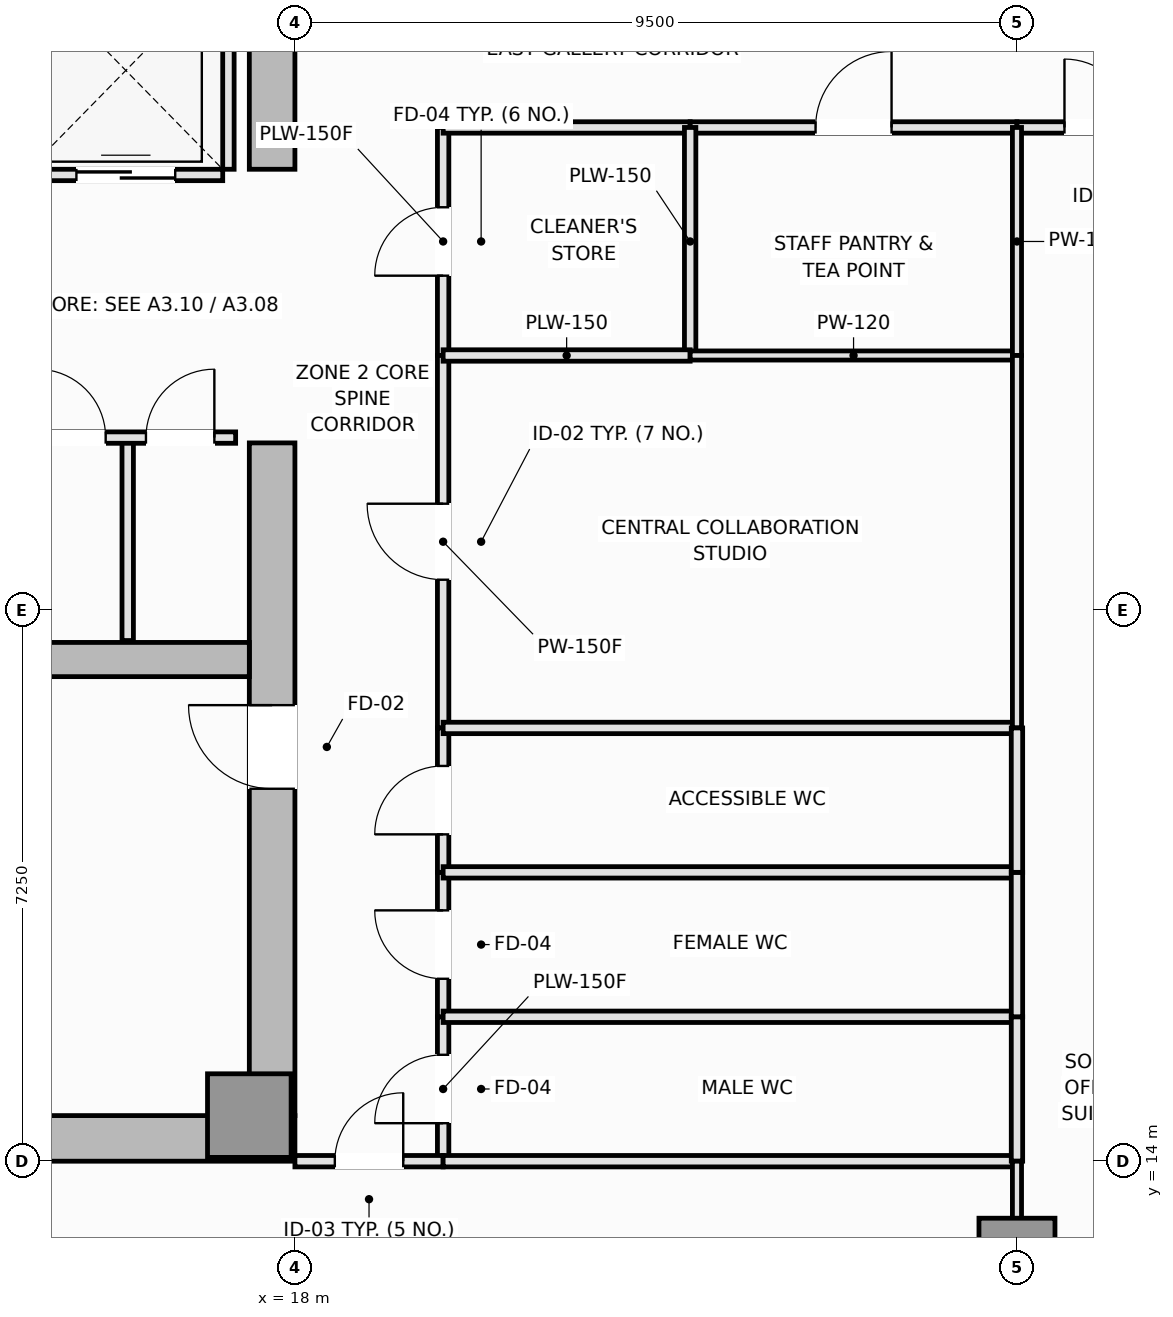
"""IFC4 building model, lengths in metres.
Left out: names, types, materials, properties, quantities, classifications, styles, units other than length and angle.
Written with IfcOpenShell. Run it as: python <this file> out.ifc"""

import sys

from ifc_helpers import new_model, si_unit, direction, frame, frame_2d, origin, origin_2d, place, context, subcontext, project, spatial, rectangle, extrude, element, fill, save


model = new_model("IFC4")
c1 = context("Model", 3, precision=1e-05, world=origin(), true_north=direction((0.0, 1.0)))
c2 = subcontext(c1, "Body", "Model", "MODEL_VIEW")
j1 = project(units=[si_unit("LENGTHUNIT", "METRE"), si_unit("PLANEANGLEUNIT", "RADIAN")], contexts=[c1])
p1 = place(None, origin())
s1 = spatial("IfcSite", under=j1, at=p1, CompositionType="ELEMENT")
p2 = place(p1, origin())
s2 = spatial("IfcBuilding", under=s1, at=p2, CompositionType="ELEMENT")
p3 = place(p2, frame((0.0, 0.0, 159.05)))
s3 = spatial("IfcBuildingStorey", under=s2, at=p3, CompositionType="ELEMENT", Elevation=159.05)
p4 = place(p3, frame((4.5, 14.3, 0.0), z_axis=(0.0, 0.0, 1.0), x_axis=(1.0, 0.0, 0.0)))
e1 = element("IfcWall", 1, at=p4, inside=s3, PredefinedType="SHEAR", context=c2, shape_type="SweptSolid", body=[
    extrude(rectangle(XDim=13.5, YDim=0.6, at=frame_2d((6.75, 0.0))), origin(), (0.0, 0.0, 1.0), 3.55),
])
p5 = place(p3, frame((17.7, 14.6, 0.0), z_axis=(0.0, 0.0, 1.0), x_axis=(0.0, 1.0, 0.0)))
e2 = element("IfcWall", 2, at=p5, inside=s3, PredefinedType="SHEAR", context=c2, shape_type="SweptSolid", body=[
    extrude(rectangle(XDim=8.85, YDim=0.6, at=frame_2d((4.425, 0.0))), origin(), (0.0, 0.0, 1.0), 3.55),
])
p6 = place(p5, frame((4.3, 0.0, 0.0)))
e3 = element("IfcOpeningElement", 3, at=p6, cuts=e2, PredefinedType="OPENING", context=c2, shape_type="SweptSolid", body=[
    extrude(rectangle(XDim=1.1, YDim=2.15, at=frame_2d((0.55, 1.075))), frame((0.0, 0.31, 0.0), z_axis=(0.0, -1.0, 0.0), x_axis=(1.0, 0.0, 0.0)), (0.0, 0.0, 1.0), 0.62),
])
p7 = place(p3, frame((17.7, 27.05, 0.0), z_axis=(0.0, 0.0, 1.0), x_axis=(0.0, 1.0, 0.0)))
e4 = element("IfcWall", 4, at=p7, inside=s3, PredefinedType="SHEAR", context=c2, shape_type="SweptSolid", body=[
    extrude(rectangle(XDim=8.85, YDim=0.6, at=frame_2d((4.425, 0.0))), origin(), (0.0, 0.0, 1.0), 3.55),
])
p8 = place(p7, frame((3.45, 0.0, 0.0)))
e5 = element("IfcOpeningElement", 5, at=p8, cuts=e4, PredefinedType="OPENING", context=c2, shape_type="SweptSolid", body=[
    extrude(rectangle(XDim=1.1, YDim=2.15, at=frame_2d((0.55, 1.075))), frame((0.0, 0.31, 0.0), z_axis=(0.0, -1.0, 0.0), x_axis=(1.0, 0.0, 0.0)), (0.0, 0.0, 1.0), 0.62),
])
p9 = place(p3, frame((5.1, 20.6, 0.0), z_axis=(0.0, 0.0, 1.0), x_axis=(1.0, 0.0, 0.0)))
e6 = element("IfcWall", 6, at=p9, inside=s3, PredefinedType="SHEAR", context=c2, shape_type="SweptSolid", body=[
    extrude(rectangle(XDim=12.3, YDim=0.45, at=frame_2d((6.15, 0.0))), origin(), (0.0, 0.0, 1.0), 3.55),
])
p10 = place(p3, frame((17.4, 14.6, 0.0), z_axis=(0.0, 0.0, 1.0), x_axis=(1.0, 0.0, 0.0)))
e7 = element("IfcColumn", 7, at=p10, inside=s3, PredefinedType="PILASTER", context=c2, shape_type="SweptSolid", body=[
    extrude(rectangle(XDim=1.1, YDim=1.1, at=origin_2d()), origin(), (0.0, 0.0, 1.0), 3.55),
])
p11 = place(p3, frame((27.5, 12.75, 0.0), z_axis=(0.0, 0.0, 1.0), x_axis=(1.0, 0.0, 0.0)))
e8 = element("IfcColumn", 8, at=p11, inside=s3, PredefinedType="COLUMN", context=c2, shape_type="SweptSolid", body=[
    extrude(rectangle(XDim=1.0, YDim=1.0, at=origin_2d()), origin(), (0.0, 0.0, 1.0), 3.55),
])
p12 = place(p3, frame((14.5, 26.975, 0.0), z_axis=(0.0, 0.0, 1.0), x_axis=(1.0, 0.0, 0.0)))
e9 = element("IfcWall", 9, at=p12, inside=s3, PredefinedType="PARTITIONING", context=c2, shape_type="SweptSolid", body=[
    extrude(rectangle(XDim=2.55, YDim=0.15, at=frame_2d((1.275, 0.0))), origin(), (0.0, 0.0, 1.0), 3.37),
])
p13 = place(p12, frame((0.625, 0.0, 0.0)))
e10 = element("IfcOpeningElement", 10, at=p13, cuts=e9, PredefinedType="OPENING", context=c2, shape_type="SweptSolid", body=[
    extrude(rectangle(XDim=1.3, YDim=2.2, at=frame_2d((0.65, 1.1))), frame((0.0, 0.085, 0.0), z_axis=(0.0, -1.0, 0.0), x_axis=(1.0, 0.0, 0.0)), (0.0, 0.0, 1.0), 0.17),
])
p14 = place(p3, frame((17.125, 27.05, 0.0), z_axis=(0.0, 0.0, 1.0), x_axis=(0.0, 1.0, 0.0)))
e11 = element("IfcWall", 11, at=p14, inside=s3, PredefinedType="PARTITIONING", context=c2, shape_type="SweptSolid", body=[
    extrude(rectangle(XDim=2.6, YDim=0.15, at=frame_2d((1.3, 0.0))), origin(), (0.0, 0.0, 1.0), 3.37),
])
p15 = place(p3, frame((15.8, 20.85, 0.0), z_axis=(0.0, 0.0, 1.0), x_axis=(0.0, 1.0, 0.0)))
e12 = element("IfcWall", 12, at=p15, inside=s3, PredefinedType="PARTITIONING", context=c2, shape_type="SweptSolid", body=[
    extrude(rectangle(XDim=2.67, YDim=0.15, at=frame_2d((1.335, 0.0))), origin(), (0.0, 0.0, 1.0), 3.37),
])
p16 = place(p3, frame((14.33, 23.52, 0.0), z_axis=(0.0, 0.0, 1.0), x_axis=(1.0, 0.0, 0.0)))
e13 = element("IfcWall", 13, at=p16, inside=s3, PredefinedType="PARTITIONING", context=c2, shape_type="SweptSolid", body=[
    extrude(rectangle(XDim=2.89, YDim=0.15, at=frame_2d((1.445, 0.0))), origin(), (0.0, 0.0, 1.0), 3.37),
])
p17 = place(p16, frame((0.28, 0.0, 0.0)))
e14 = element("IfcOpeningElement", 14, at=p17, cuts=e13, PredefinedType="OPENING", context=c2, shape_type="SweptSolid", body=[
    extrude(rectangle(XDim=0.9, YDim=2.1, at=frame_2d((0.45, 1.05))), frame((0.0, 0.085, 0.0), z_axis=(0.0, -1.0, 0.0), x_axis=(1.0, 0.0, 0.0)), (0.0, 0.0, 1.0), 0.17),
])
p18 = place(p16, frame((1.71, 0.0, 0.0)))
e15 = element("IfcOpeningElement", 15, at=p18, cuts=e13, PredefinedType="OPENING", context=c2, shape_type="SweptSolid", body=[
    extrude(rectangle(XDim=0.9, YDim=2.1, at=frame_2d((0.45, 1.05))), frame((0.0, 0.085, 0.0), z_axis=(0.0, -1.0, 0.0), x_axis=(1.0, 0.0, 0.0)), (0.0, 0.0, 1.0), 0.17),
])
p19 = place(p3, frame((19.95, 24.6, 0.0), z_axis=(0.0, 0.0, 1.0), x_axis=(0.0, 1.0, 0.0)))
e16 = element("IfcWall", 16, at=p19, inside=s3, PredefinedType="PLUMBINGWALL", context=c2, shape_type="SweptSolid", body=[
    extrude(rectangle(XDim=3.0, YDim=0.15, at=frame_2d((1.5, 0.0))), origin(), (0.0, 0.0, 1.0), 3.37),
])
p20 = place(p19, frame((1.05, 0.0, 0.0)))
e17 = element("IfcOpeningElement", 17, at=p20, cuts=e16, PredefinedType="OPENING", context=c2, shape_type="SweptSolid", body=[
    extrude(rectangle(XDim=0.9, YDim=2.1, at=frame_2d((0.45, 1.05))), frame((0.0, 0.085, 0.0), z_axis=(0.0, -1.0, 0.0), x_axis=(1.0, 0.0, 0.0)), (0.0, 0.0, 1.0), 0.17),
])
p21 = place(p3, frame((19.95, 19.7, 0.0), z_axis=(0.0, 0.0, 1.0), x_axis=(0.0, 1.0, 0.0)))
e18 = element("IfcWall", 18, at=p21, inside=s3, PredefinedType="PARTITIONING", context=c2, shape_type="SweptSolid", body=[
    extrude(rectangle(XDim=4.9, YDim=0.15, at=frame_2d((2.45, 0.0))), origin(), (0.0, 0.0, 1.0), 3.37),
])
p22 = place(p21, frame((1.95, 0.0, 0.0)))
e19 = element("IfcOpeningElement", 19, at=p22, cuts=e18, PredefinedType="OPENING", context=c2, shape_type="SweptSolid", body=[
    extrude(rectangle(XDim=1.0, YDim=2.15, at=frame_2d((0.5, 1.075))), frame((0.0, 0.085, 0.0), z_axis=(0.0, -1.0, 0.0), x_axis=(1.0, 0.0, 0.0)), (0.0, 0.0, 1.0), 0.17),
])
p23 = place(p3, frame((19.95, 14.0, 0.0), z_axis=(0.0, 0.0, 1.0), x_axis=(0.0, 1.0, 0.0)))
e20 = element("IfcWall", 20, at=p23, inside=s3, PredefinedType="PLUMBINGWALL", context=c2, shape_type="SweptSolid", body=[
    extrude(rectangle(XDim=1.9, YDim=0.15, at=frame_2d((0.95, 0.0))), origin(), (0.0, 0.0, 1.0), 3.37),
])
p24 = place(p23, frame((0.5, 0.0, 0.0)))
e21 = element("IfcOpeningElement", 21, at=p24, cuts=e20, PredefinedType="OPENING", context=c2, shape_type="SweptSolid", body=[
    extrude(rectangle(XDim=0.9, YDim=2.1, at=frame_2d((0.45, 1.05))), frame((0.0, 0.085, 0.0), z_axis=(0.0, -1.0, 0.0), x_axis=(1.0, 0.0, 0.0)), (0.0, 0.0, 1.0), 0.17),
])
p25 = place(p3, frame((19.95, 15.9, 0.0), z_axis=(0.0, 0.0, 1.0), x_axis=(0.0, 1.0, 0.0)))
e22 = element("IfcWall", 22, at=p25, inside=s3, PredefinedType="PLUMBINGWALL", context=c2, shape_type="SweptSolid", body=[
    extrude(rectangle(XDim=1.9, YDim=0.15, at=frame_2d((0.95, 0.0))), origin(), (0.0, 0.0, 1.0), 3.37),
])
p26 = place(p25, frame((0.5, 0.0, 0.0)))
e23 = element("IfcOpeningElement", 23, at=p26, cuts=e22, PredefinedType="OPENING", context=c2, shape_type="SweptSolid", body=[
    extrude(rectangle(XDim=0.9, YDim=2.1, at=frame_2d((0.45, 1.05))), frame((0.0, 0.085, 0.0), z_axis=(0.0, -1.0, 0.0), x_axis=(1.0, 0.0, 0.0)), (0.0, 0.0, 1.0), 0.17),
])
p27 = place(p3, frame((19.95, 17.8, 0.0), z_axis=(0.0, 0.0, 1.0), x_axis=(0.0, 1.0, 0.0)))
e24 = element("IfcWall", 24, at=p27, inside=s3, PredefinedType="PLUMBINGWALL", context=c2, shape_type="SweptSolid", body=[
    extrude(rectangle(XDim=1.9, YDim=0.15, at=frame_2d((0.95, 0.0))), origin(), (0.0, 0.0, 1.0), 3.37),
])
p28 = place(p27, frame((0.5, 0.0, 0.0)))
e25 = element("IfcOpeningElement", 25, at=p28, cuts=e24, PredefinedType="OPENING", context=c2, shape_type="SweptSolid", body=[
    extrude(rectangle(XDim=0.9, YDim=2.1, at=frame_2d((0.45, 1.05))), frame((0.0, 0.085, 0.0), z_axis=(0.0, -1.0, 0.0), x_axis=(1.0, 0.0, 0.0)), (0.0, 0.0, 1.0), 0.17),
])
p29 = place(p3, frame((18.0, 14.0, 0.0), z_axis=(0.0, 0.0, 1.0), x_axis=(1.0, 0.0, 0.0)))
e26 = element("IfcWall", 26, at=p29, inside=s3, PredefinedType="PARTITIONING", context=c2, shape_type="SweptSolid", body=[
    extrude(rectangle(XDim=1.95, YDim=0.15, at=frame_2d((0.975, 0.0))), origin(), (0.0, 0.0, 1.0), 3.37),
])
p30 = place(p29, frame((0.525, 0.0, 0.0)))
e27 = element("IfcOpeningElement", 27, at=p30, cuts=e26, PredefinedType="OPENING", context=c2, shape_type="SweptSolid", body=[
    extrude(rectangle(XDim=0.9, YDim=2.1, at=frame_2d((0.45, 1.05))), frame((0.0, 0.085, 0.0), z_axis=(0.0, -1.0, 0.0), x_axis=(1.0, 0.0, 0.0)), (0.0, 0.0, 1.0), 0.17),
])
p31 = place(p3, frame((19.95, 27.6, 0.0), z_axis=(0.0, 0.0, 1.0), x_axis=(1.0, 0.0, 0.0)))
e28 = element("IfcWall", 28, at=p31, inside=s3, PredefinedType="PLUMBINGWALL", context=c2, shape_type="SweptSolid", body=[
    extrude(rectangle(XDim=3.25, YDim=0.15, at=frame_2d((1.625, 0.0))), origin(), (0.0, 0.0, 1.0), 3.37),
])
p32 = place(p3, frame((23.2, 27.6, 0.0), z_axis=(0.0, 0.0, 1.0), x_axis=(1.0, 0.0, 0.0)))
e29 = element("IfcWall", 29, at=p32, inside=s3, PredefinedType="PARTITIONING", context=c2, shape_type="SweptSolid", body=[
    extrude(rectangle(XDim=4.3, YDim=0.15, at=frame_2d((2.15, 0.0))), origin(), (0.0, 0.0, 1.0), 3.37),
])
p33 = place(p32, frame((1.65, 0.0, 0.0)))
e30 = element("IfcOpeningElement", 30, at=p33, cuts=e29, PredefinedType="OPENING", context=c2, shape_type="SweptSolid", body=[
    extrude(rectangle(XDim=1.0, YDim=2.15, at=frame_2d((0.5, 1.075))), frame((0.0, 0.085, 0.0), z_axis=(0.0, -1.0, 0.0), x_axis=(1.0, 0.0, 0.0)), (0.0, 0.0, 1.0), 0.17),
])
p34 = place(p3, frame((27.5, 27.6, 0.0), z_axis=(0.0, 0.0, 1.0), x_axis=(1.0, 0.0, 0.0)))
e31 = element("IfcWall", 31, at=p34, inside=s3, PredefinedType="PARTITIONING", context=c2, shape_type="SweptSolid", body=[
    extrude(rectangle(XDim=2.15, YDim=0.15, at=frame_2d((1.075, 0.0))), origin(), (0.0, 0.0, 1.0), 3.37),
])
p35 = place(p34, frame((0.625, 0.0, 0.0)))
e32 = element("IfcOpeningElement", 32, at=p35, cuts=e31, PredefinedType="OPENING", context=c2, shape_type="SweptSolid", body=[
    extrude(rectangle(XDim=0.9, YDim=2.1, at=frame_2d((0.45, 1.05))), frame((0.0, 0.085, 0.0), z_axis=(0.0, -1.0, 0.0), x_axis=(1.0, 0.0, 0.0)), (0.0, 0.0, 1.0), 0.17),
])
p36 = place(p3, frame((23.2, 24.6, 0.0), z_axis=(0.0, 0.0, 1.0), x_axis=(0.0, 1.0, 0.0)))
e33 = element("IfcWall", 33, at=p36, inside=s3, PredefinedType="PLUMBINGWALL", context=c2, shape_type="SweptSolid", body=[
    extrude(rectangle(XDim=3.0, YDim=0.15, at=frame_2d((1.5, 0.0))), origin(), (0.0, 0.0, 1.0), 3.37),
])
p37 = place(p3, frame((19.95, 24.6, 0.0), z_axis=(0.0, 0.0, 1.0), x_axis=(1.0, 0.0, 0.0)))
e34 = element("IfcWall", 34, at=p37, inside=s3, PredefinedType="PLUMBINGWALL", context=c2, shape_type="SweptSolid", body=[
    extrude(rectangle(XDim=3.25, YDim=0.15, at=frame_2d((1.625, 0.0))), origin(), (0.0, 0.0, 1.0), 3.37),
])
p38 = place(p3, frame((23.2, 24.6, 0.0), z_axis=(0.0, 0.0, 1.0), x_axis=(1.0, 0.0, 0.0)))
e35 = element("IfcWall", 35, at=p38, inside=s3, PredefinedType="PARTITIONING", context=c2, shape_type="SweptSolid", body=[
    extrude(rectangle(XDim=4.3, YDim=0.12, at=frame_2d((2.15, 0.0))), origin(), (0.0, 0.0, 1.0), 3.37),
])
p39 = place(p3, frame((27.5, 24.6, 0.0), z_axis=(0.0, 0.0, 1.0), x_axis=(0.0, 1.0, 0.0)))
e36 = element("IfcWall", 36, at=p39, inside=s3, PredefinedType="PARTITIONING", context=c2, shape_type="SweptSolid", body=[
    extrude(rectangle(XDim=3.0, YDim=0.12, at=frame_2d((1.5, 0.0))), origin(), (0.0, 0.0, 1.0), 3.37),
])
p40 = place(p3, frame((19.95, 19.7, 0.0), z_axis=(0.0, 0.0, 1.0), x_axis=(1.0, 0.0, 0.0)))
e37 = element("IfcWall", 37, at=p40, inside=s3, PredefinedType="PLUMBINGWALL", context=c2, shape_type="SweptSolid", body=[
    extrude(rectangle(XDim=7.55, YDim=0.15, at=frame_2d((3.775, 0.0))), origin(), (0.0, 0.0, 1.0), 3.37),
])
p41 = place(p3, frame((27.5, 19.7, 0.0), z_axis=(0.0, 0.0, 1.0), x_axis=(0.0, 1.0, 0.0)))
e38 = element("IfcWall", 38, at=p41, inside=s3, PredefinedType="PARTITIONING", context=c2, shape_type="SweptSolid", body=[
    extrude(rectangle(XDim=4.9, YDim=0.12, at=frame_2d((2.45, 0.0))), origin(), (0.0, 0.0, 1.0), 3.37),
])
for number, where, z_axis, x_axis in (
    (39, (19.95, 15.9, 0.0), (0.0, 0.0, 1.0), (1.0, 0.0, 0.0)),
    (40, (19.95, 14.0, 0.0), (0.0, 0.0, 1.0), (1.0, 0.0, 0.0)),
):
    element("IfcWall", number, at=place(p3, frame(where, z_axis=z_axis, x_axis=x_axis)), inside=s3, PredefinedType="PLUMBINGWALL", context=c2, shape_type="SweptSolid", body=[
        extrude(rectangle(XDim=7.55, YDim=0.15, at=frame_2d((3.775, 0.0))), origin(), (0.0, 0.0, 1.0), 3.37),
    ])
p42 = place(p3, frame((27.5, 14.0, 0.0), z_axis=(0.0, 0.0, 1.0), x_axis=(0.0, 1.0, 0.0)))
e41 = element("IfcWall", 41, at=p42, inside=s3, PredefinedType="PLUMBINGWALL", context=c2, shape_type="SweptSolid", body=[
    extrude(rectangle(XDim=1.9, YDim=0.15, at=frame_2d((0.95, 0.0))), origin(), (0.0, 0.0, 1.0), 3.37),
])
p43 = place(p3, frame((19.95, 17.8, 0.0), z_axis=(0.0, 0.0, 1.0), x_axis=(1.0, 0.0, 0.0)))
e42 = element("IfcWall", 42, at=p43, inside=s3, PredefinedType="PLUMBINGWALL", context=c2, shape_type="SweptSolid", body=[
    extrude(rectangle(XDim=7.55, YDim=0.15, at=frame_2d((3.775, 0.0))), origin(), (0.0, 0.0, 1.0), 3.37),
])
p44 = place(p3, frame((27.5, 15.9, 0.0), z_axis=(0.0, 0.0, 1.0), x_axis=(0.0, 1.0, 0.0)))
e43 = element("IfcWall", 43, at=p44, inside=s3, PredefinedType="PLUMBINGWALL", context=c2, shape_type="SweptSolid", body=[
    extrude(rectangle(XDim=1.9, YDim=0.15, at=frame_2d((0.95, 0.0))), origin(), (0.0, 0.0, 1.0), 3.37),
])
p45 = place(p3, frame((27.5, 17.8, 0.0), z_axis=(0.0, 0.0, 1.0), x_axis=(0.0, 1.0, 0.0)))
e44 = element("IfcWall", 44, at=p45, inside=s3, PredefinedType="PLUMBINGWALL", context=c2, shape_type="SweptSolid", body=[
    extrude(rectangle(XDim=1.9, YDim=0.15, at=frame_2d((0.95, 0.0))), origin(), (0.0, 0.0, 1.0), 3.37),
])
p46 = place(p3, frame((27.5, 3.51, 0.0), z_axis=(0.0, 0.0, 1.0), x_axis=(0.0, 1.0, 0.0)))
e45 = element("IfcWall", 45, at=p46, inside=s3, PredefinedType="PARTITIONING", context=c2, shape_type="SweptSolid", body=[
    extrude(rectangle(XDim=10.49, YDim=0.12, at=frame_2d((5.245, 0.0))), origin(), (0.0, 0.0, 1.0), 2.87),
])
p47 = place(p13, origin())
e46 = element("IfcDoor", 46, at=p47, inside=s3, OperationType="DOUBLE_DOOR_SLIDING", PredefinedType="DOOR", context=c2, shape_type="SweptSolid", body=[
    extrude(rectangle(XDim=1.3, YDim=2.2, at=frame_2d((0.65, 1.1))), frame((0.0, 0.025, 0.0), z_axis=(0.0, -1.0, 0.0), x_axis=(1.0, 0.0, 0.0)), (0.0, 0.0, 1.0), 0.05),
])
fill(e10, e46)
p48 = place(p6, origin())
e47 = element("IfcDoor", 47, at=p48, inside=s3, OperationType="SINGLE_SWING_RIGHT", PredefinedType="DOOR", context=c2, shape_type="SweptSolid", body=[
    extrude(rectangle(XDim=1.1, YDim=2.15, at=frame_2d((0.55, 1.075))), frame((0.0, 0.025, 0.0), z_axis=(0.0, -1.0, 0.0), x_axis=(1.0, 0.0, 0.0)), (0.0, 0.0, 1.0), 0.05),
])
fill(e3, e47)
p49 = place(p17, origin())
e48 = element("IfcDoor", 48, at=p49, inside=s3, OperationType="SINGLE_SWING_LEFT", PredefinedType="DOOR", context=c2, shape_type="SweptSolid", body=[
    extrude(rectangle(XDim=0.9, YDim=2.1, at=frame_2d((0.45, 1.05))), frame((0.0, 0.025, 0.0), z_axis=(0.0, -1.0, 0.0), x_axis=(1.0, 0.0, 0.0)), (0.0, 0.0, 1.0), 0.05),
])
fill(e14, e48)
p50 = place(p18, origin())
e49 = element("IfcDoor", 49, at=p50, inside=s3, OperationType="SINGLE_SWING_RIGHT", PredefinedType="DOOR", context=c2, shape_type="SweptSolid", body=[
    extrude(rectangle(XDim=0.9, YDim=2.1, at=frame_2d((0.45, 1.05))), frame((0.0, 0.025, 0.0), z_axis=(0.0, -1.0, 0.0), x_axis=(1.0, 0.0, 0.0)), (0.0, 0.0, 1.0), 0.05),
])
fill(e15, e49)
p51 = place(p20, origin())
e50 = element("IfcDoor", 50, at=p51, inside=s3, OperationType="SINGLE_SWING_LEFT", PredefinedType="DOOR", context=c2, shape_type="SweptSolid", body=[
    extrude(rectangle(XDim=0.9, YDim=2.1, at=frame_2d((0.45, 1.05))), frame((0.0, 0.025, 0.0), z_axis=(0.0, -1.0, 0.0), x_axis=(1.0, 0.0, 0.0)), (0.0, 0.0, 1.0), 0.05),
])
fill(e17, e50)
p52 = place(p22, origin())
e51 = element("IfcDoor", 51, at=p52, inside=s3, OperationType="SINGLE_SWING_RIGHT", PredefinedType="DOOR", context=c2, shape_type="SweptSolid", body=[
    extrude(rectangle(XDim=1.0, YDim=2.15, at=frame_2d((0.5, 1.075))), frame((0.0, 0.025, 0.0), z_axis=(0.0, -1.0, 0.0), x_axis=(1.0, 0.0, 0.0)), (0.0, 0.0, 1.0), 0.05),
])
fill(e19, e51)
p53 = place(p24, origin())
e52 = element("IfcDoor", 52, at=p53, inside=s3, OperationType="SINGLE_SWING_LEFT", PredefinedType="DOOR", context=c2, shape_type="SweptSolid", body=[
    extrude(rectangle(XDim=0.9, YDim=2.1, at=frame_2d((0.45, 1.05))), frame((0.0, 0.025, 0.0), z_axis=(0.0, -1.0, 0.0), x_axis=(1.0, 0.0, 0.0)), (0.0, 0.0, 1.0), 0.05),
])
fill(e21, e52)
p54 = place(p26, origin())
e53 = element("IfcDoor", 53, at=p54, inside=s3, OperationType="SINGLE_SWING_RIGHT", PredefinedType="DOOR", context=c2, shape_type="SweptSolid", body=[
    extrude(rectangle(XDim=0.9, YDim=2.1, at=frame_2d((0.45, 1.05))), frame((0.0, 0.025, 0.0), z_axis=(0.0, -1.0, 0.0), x_axis=(1.0, 0.0, 0.0)), (0.0, 0.0, 1.0), 0.05),
])
fill(e23, e53)
p55 = place(p28, origin())
e54 = element("IfcDoor", 54, at=p55, inside=s3, OperationType="SINGLE_SWING_LEFT", PredefinedType="DOOR", context=c2, shape_type="SweptSolid", body=[
    extrude(rectangle(XDim=0.9, YDim=2.1, at=frame_2d((0.45, 1.05))), frame((0.0, 0.025, 0.0), z_axis=(0.0, -1.0, 0.0), x_axis=(1.0, 0.0, 0.0)), (0.0, 0.0, 1.0), 0.05),
])
fill(e25, e54)
p56 = place(p30, origin())
e55 = element("IfcDoor", 55, at=p56, inside=s3, OperationType="SINGLE_SWING_RIGHT", PredefinedType="DOOR", context=c2, shape_type="SweptSolid", body=[
    extrude(rectangle(XDim=0.9, YDim=2.1, at=frame_2d((0.45, 1.05))), frame((0.0, 0.025, 0.0), z_axis=(0.0, -1.0, 0.0), x_axis=(1.0, 0.0, 0.0)), (0.0, 0.0, 1.0), 0.05),
])
fill(e27, e55)
p57 = place(p33, origin())
e56 = element("IfcDoor", 56, at=p57, inside=s3, OperationType="SINGLE_SWING_RIGHT", PredefinedType="DOOR", context=c2, shape_type="SweptSolid", body=[
    extrude(rectangle(XDim=1.0, YDim=2.15, at=frame_2d((0.5, 1.075))), frame((0.0, 0.025, 0.0), z_axis=(0.0, -1.0, 0.0), x_axis=(1.0, 0.0, 0.0)), (0.0, 0.0, 1.0), 0.05),
])
fill(e30, e56)
p58 = place(p35, origin())
e57 = element("IfcDoor", 57, at=p58, inside=s3, OperationType="SINGLE_SWING_LEFT", PredefinedType="DOOR", context=c2, shape_type="SweptSolid", body=[
    extrude(rectangle(XDim=0.9, YDim=2.1, at=frame_2d((0.45, 1.05))), frame((0.0, 0.025, 0.0), z_axis=(0.0, -1.0, 0.0), x_axis=(1.0, 0.0, 0.0)), (0.0, 0.0, 1.0), 0.05),
])
fill(e32, e57)
save(model, sys.argv[1])
